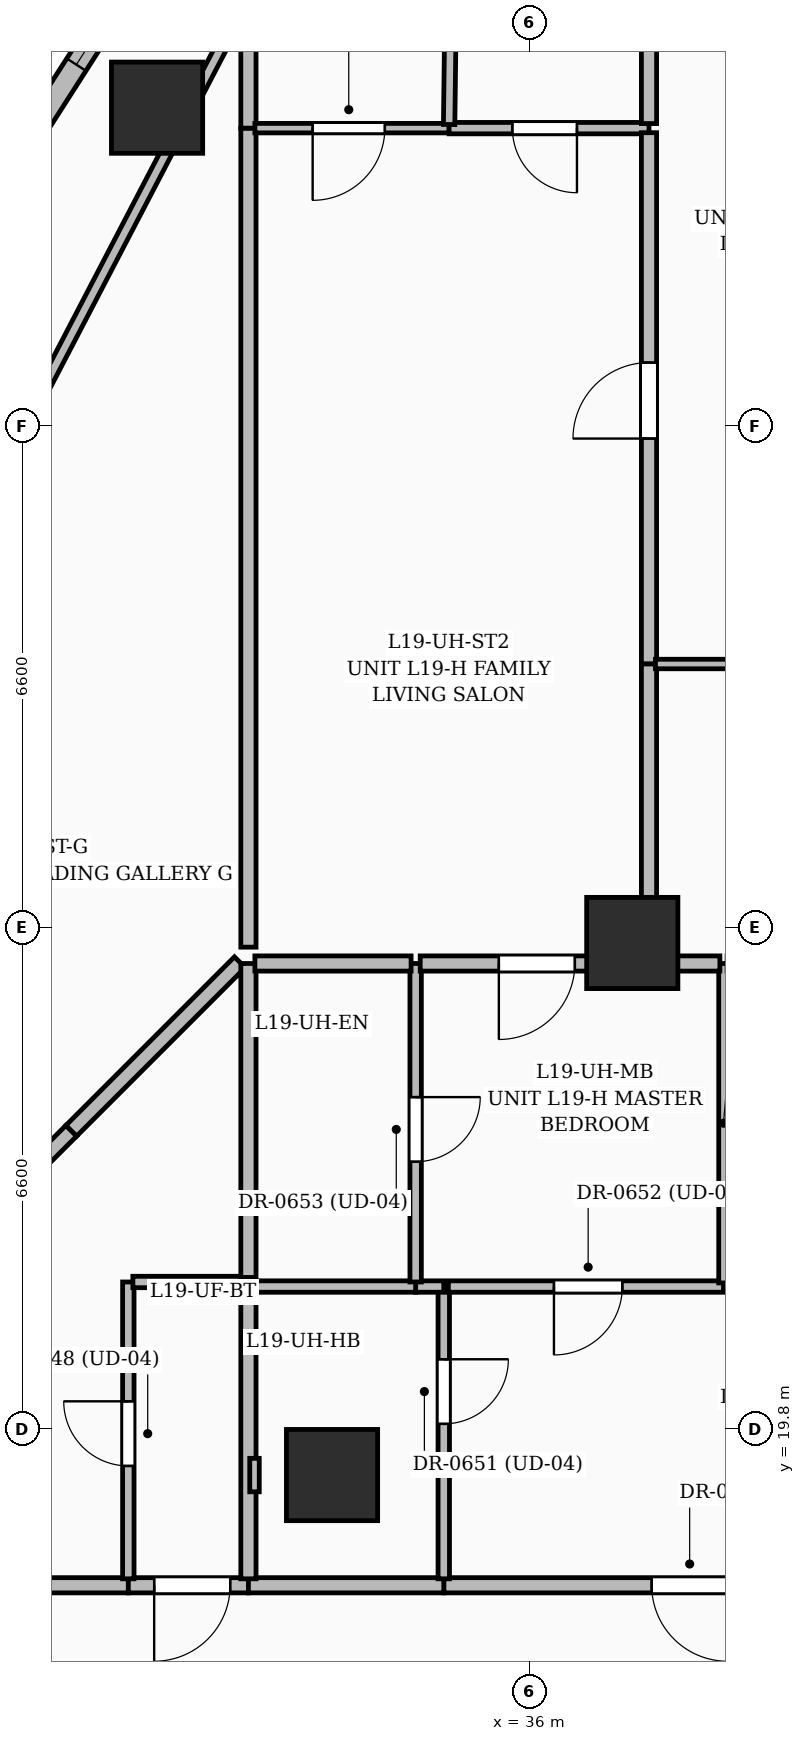
"""IFC4 building model, lengths in metres.
Left out: names, types, materials, properties, quantities, classifications, styles, units other than length and angle.
Written with IfcOpenShell. Run it as: python <this file> out.ifc"""

import sys

from ifc_helpers import new_model, si_unit, direction, frame, frame_2d, origin, origin_2d, place, context, subcontext, project, spatial, rectangle, extrude, element, fill, save


model = new_model("IFC4")
c1 = context("Model", 3, precision=1e-05, world=origin(), true_north=direction((0.0, 1.0)))
c2 = subcontext(c1, "Body", "Model", "MODEL_VIEW")
j1 = project(units=[si_unit("LENGTHUNIT", "METRE"), si_unit("PLANEANGLEUNIT", "RADIAN")], contexts=[c1])
p1 = place(None, origin())
s1 = spatial("IfcSite", under=j1, at=p1, CompositionType="ELEMENT")
p2 = place(p1, origin())
s2 = spatial("IfcBuilding", under=s1, at=p2, CompositionType="ELEMENT")
p3 = place(p2, frame((0.0, 0.0, 78.6)))
s3 = spatial("IfcBuildingStorey", under=s2, at=p3, CompositionType="ELEMENT", Elevation=78.6)
for number, where, z_axis, x_axis in (
    (1, (37.35, 26.2, 0.0), (0.0, 0.0, 1.0), (1.0, 0.0, 0.0)),
    (2, (33.4, 19.2, 0.0), (0.0, 0.0, 1.0), (1.0, 0.0, 0.0)),
    (3, (31.098, 37.189, 0.0), (0.0, 0.0, 1.0), (1.0, 0.0, 0.0)),
):
    element("IfcColumn", number, at=place(p3, frame(where, z_axis=z_axis, x_axis=x_axis)), inside=s3, PredefinedType="COLUMN", context=c2, shape_type="SweptSolid", body=[
        extrude(rectangle(XDim=1.2, YDim=1.2, at=origin_2d()), origin(), (0.0, 0.0, 1.0), 3.6),
    ])
p4 = place(p3, frame((29.524, 36.955, 0.0), z_axis=(0.0, 0.0, 1.0), x_axis=(0.539470626143, 0.842004420136, 0.0)))
e4 = element("IfcWall", 4, at=p4, inside=s3, PredefinedType="SOLIDWALL", context=c2, shape_type="SweptSolid", body=[
    extrude(rectangle(XDim=8.058, YDim=0.3, at=frame_2d((4.029, 0.0))), origin(), (0.0, 0.0, 1.0), 3.35),
])
p5 = place(p4, frame((0.95, 0.0, 0.6)))
e5 = element("IfcOpeningElement", 5, at=p5, cuts=e4, PredefinedType="OPENING", context=c2, shape_type="SweptSolid", body=[
    extrude(rectangle(XDim=2.4, YDim=2.1, at=frame_2d((1.2, 1.05))), frame((0.0, 0.16, 0.0), z_axis=(0.0, -1.0, 0.0), x_axis=(1.0, 0.0, 0.0)), (0.0, 0.0, 1.0), 0.32),
])
p6 = place(p3, frame((30.72, 17.75, 0.0), z_axis=(0.0, 0.0, 1.0), x_axis=(-1.0, 0.0, 0.0)))
e6 = element("IfcWall", 6, at=p6, inside=s3, PredefinedType="PARTITIONING", context=c2, shape_type="SweptSolid", body=[
    extrude(rectangle(XDim=6.57, YDim=0.2, at=frame_2d((3.285, 0.0))), origin(), (0.0, 0.0, 1.0), 2.345),
])
p7 = place(p6, frame((2.865, 0.0, 0.0)))
e7 = element("IfcOpeningElement", 7, at=p7, cuts=e6, PredefinedType="OPENING", context=c2, shape_type="SweptSolid", body=[
    extrude(rectangle(XDim=1.0, YDim=2.2, at=frame_2d((0.5, 1.1))), frame((0.0, 0.11, 0.0), z_axis=(0.0, -1.0, 0.0), x_axis=(1.0, 0.0, 0.0)), (0.0, 0.0, 1.0), 0.22),
])
p8 = place(p3, frame((32.3, 17.75, 0.0), z_axis=(0.0, 0.0, 1.0), x_axis=(-1.0, 0.0, 0.0)))
e8 = element("IfcWall", 8, at=p8, inside=s3, PredefinedType="PARTITIONING", context=c2, shape_type="SweptSolid", body=[
    extrude(rectangle(XDim=1.58, YDim=0.2, at=frame_2d((0.79, 0.0))), origin(), (0.0, 0.0, 1.0), 3.35),
])
p9 = place(p8, frame((0.24, 0.0, 0.0)))
e9 = element("IfcOpeningElement", 9, at=p9, cuts=e8, PredefinedType="OPENING", context=c2, shape_type="SweptSolid", body=[
    extrude(rectangle(XDim=1.0, YDim=2.2, at=frame_2d((0.5, 1.1))), frame((0.0, 0.11, 0.0), z_axis=(0.0, -1.0, 0.0), x_axis=(1.0, 0.0, 0.0)), (0.0, 0.0, 1.0), 0.22),
])
p10 = place(p3, frame((41.34, 17.75, 0.0), z_axis=(0.0, 0.0, 1.0), x_axis=(-1.0, 0.0, 0.0)))
e10 = element("IfcWall", 10, at=p10, inside=s3, PredefinedType="PARTITIONING", context=c2, shape_type="SweptSolid", body=[
    extrude(rectangle(XDim=6.47, YDim=0.2, at=frame_2d((3.235, 0.0))), origin(), (0.0, 0.0, 1.0), 3.35),
])
p11 = place(p10, frame((2.735, 0.0, 0.0)))
e11 = element("IfcOpeningElement", 11, at=p11, cuts=e10, PredefinedType="OPENING", context=c2, shape_type="SweptSolid", body=[
    extrude(rectangle(XDim=1.0, YDim=2.2, at=frame_2d((0.5, 1.1))), frame((0.0, 0.11, 0.0), z_axis=(0.0, -1.0, 0.0), x_axis=(1.0, 0.0, 0.0)), (0.0, 0.0, 1.0), 0.22),
])
p12 = place(p3, frame((34.87, 17.75, 0.0), z_axis=(0.0, 0.0, 1.0), x_axis=(-1.0, 0.0, 0.0)))
e12 = element("IfcWall", 12, at=p12, inside=s3, PredefinedType="PARTITIONING", context=c2, shape_type="SweptSolid", body=[
    extrude(rectangle(XDim=2.57, YDim=0.2, at=frame_2d((1.285, 0.0))), origin(), (0.0, 0.0, 1.0), 2.309),
])
p13 = place(p3, frame((21.4, 17.75, 0.0), z_axis=(0.0, 0.0, 1.0), x_axis=(0.46207959711, 0.886838455376, 0.0)))
e13 = element("IfcWall", 13, at=p13, inside=s3, PredefinedType="PARTITIONING", context=c2, shape_type="SweptSolid", body=[
    extrude(rectangle(XDim=23.589, YDim=0.15, at=frame_2d((11.795, 0.0))), origin(), (0.0, 0.0, 1.0), 2.345),
])
p14 = place(p3, frame((30.72, 17.835, 0.0), z_axis=(0.0, 0.0, 1.0), x_axis=(0.0, 1.0, 0.0)))
e14 = element("IfcWall", 14, at=p14, inside=s3, PredefinedType="PARTITIONING", context=c2, shape_type="SweptSolid", body=[
    extrude(rectangle(XDim=3.905, YDim=0.15, at=frame_2d((1.953, 0.0))), origin(), (0.0, 0.0, 1.0), 2.345),
])
p15 = place(p14, frame((1.485, 0.0, 0.0)))
e15 = element("IfcOpeningElement", 15, at=p15, cuts=e14, PredefinedType="OPENING", context=c2, shape_type="SweptSolid", body=[
    extrude(rectangle(XDim=0.85, YDim=2.1, at=frame_2d((0.425, 1.05))), frame((0.0, 0.085, 0.0), z_axis=(0.0, -1.0, 0.0), x_axis=(1.0, 0.0, 0.0)), (0.0, 0.0, 1.0), 0.17),
])
p16 = place(p3, frame((29.97, 23.73, 0.0), z_axis=(0.0, 0.0, 1.0), x_axis=(-0.707106781187, -0.707106781187, 0.0)))
e16 = element("IfcWall", 16, at=p16, inside=s3, PredefinedType="PARTITIONING", context=c2, shape_type="SweptSolid", body=[
    extrude(rectangle(XDim=8.372, YDim=0.2, at=frame_2d((4.186, 0.0))), origin(), (0.0, 0.0, 1.0), 2.345),
])
p17 = place(p3, frame((30.78, 21.74, 0.0), z_axis=(0.0, 0.0, 1.0), x_axis=(1.0, 0.0, 0.0)))
e17 = element("IfcWall", 17, at=p17, inside=s3, PredefinedType="PARTITIONING", context=c2, shape_type="SweptSolid", body=[
    extrude(rectangle(XDim=1.52, YDim=0.15, at=frame_2d((0.76, 0.0))), origin(), (0.0, 0.0, 1.0), 2.345),
])
p18 = place(p3, frame((32.187, 25.947, 0.0), z_axis=(0.0, 0.0, 1.0), x_axis=(-0.707106781187, -0.707106781187, 0.0)))
e18 = element("IfcWall", 18, at=p18, inside=s3, PredefinedType="PARTITIONING", context=c2, shape_type="SweptSolid", body=[
    extrude(rectangle(XDim=3.135, YDim=0.2, at=frame_2d((1.568, 0.0))), origin(), (0.0, 0.0, 1.0), 3.35),
])
p19 = place(p3, frame((32.3, 21.8, 0.0), z_axis=(0.0, 0.0, 1.0), x_axis=(0.0, 1.0, 0.0)))
e19 = element("IfcWall", 19, at=p19, inside=s3, PredefinedType="PARTITIONING", context=c2, shape_type="SweptSolid", body=[
    extrude(rectangle(XDim=4.13, YDim=0.2, at=frame_2d((2.065, 0.0))), origin(), (0.0, 0.0, 1.0), 3.01),
])
p20 = place(p3, frame((32.3, 17.835, 0.0), z_axis=(0.0, 0.0, 1.0), x_axis=(0.0, 1.0, 0.0)))
e20 = element("IfcWall", 20, at=p20, inside=s3, PredefinedType="PARTITIONING", context=c2, shape_type="SweptSolid", body=[
    extrude(rectangle(XDim=3.845, YDim=0.2, at=frame_2d((1.922, 0.0))), origin(), (0.0, 0.0, 1.0), 2.345),
])
p21 = place(p3, frame((32.3, 26.145, 0.0), z_axis=(0.0, 0.0, 1.0), x_axis=(0.0, 1.0, 0.0)))
e21 = element("IfcWall", 21, at=p21, inside=s3, PredefinedType="PARTITIONING", context=c2, shape_type="SweptSolid", body=[
    extrude(rectangle(XDim=10.775, YDim=0.2, at=frame_2d((5.387, 0.0))), origin(), (0.0, 0.0, 1.0), 2.345),
])
p22 = place(p3, frame((32.3, 36.92, 0.0), z_axis=(0.0, 0.0, 1.0), x_axis=(0.0, 1.0, 0.0)))
e22 = element("IfcWall", 22, at=p22, inside=s3, PredefinedType="PARTITIONING", context=c2, shape_type="SweptSolid", body=[
    extrude(rectangle(XDim=1.317, YDim=0.2, at=frame_2d((0.659, 0.0))), origin(), (0.0, 0.0, 1.0), 2.37),
])
p23 = place(p3, frame((34.87, 21.68, 0.0), z_axis=(0.0, 0.0, 1.0), x_axis=(0.0, -1.0, 0.0)))
e23 = element("IfcWall", 23, at=p23, inside=s3, PredefinedType="PARTITIONING", context=c2, shape_type="SweptSolid", body=[
    extrude(rectangle(XDim=3.845, YDim=0.15, at=frame_2d((1.922, 0.0))), origin(), (0.0, 0.0, 1.0), 2.309),
])
p24 = place(p23, frame((0.957, 0.0, 0.0)))
e24 = element("IfcOpeningElement", 24, at=p24, cuts=e23, PredefinedType="OPENING", context=c2, shape_type="SweptSolid", body=[
    extrude(rectangle(XDim=0.85, YDim=2.1, at=frame_2d((0.425, 1.05))), frame((0.0, 0.085, 0.0), z_axis=(0.0, -1.0, 0.0), x_axis=(1.0, 0.0, 0.0)), (0.0, 0.0, 1.0), 0.17),
])
p25 = place(p3, frame((41.292, 21.68, 0.0), z_axis=(0.0, 0.0, 1.0), x_axis=(-1.0, 0.0, 0.0)))
e25 = element("IfcWall", 25, at=p25, inside=s3, PredefinedType="PARTITIONING", context=c2, shape_type="SweptSolid", body=[
    extrude(rectangle(XDim=2.742, YDim=0.125, at=frame_2d((1.371, 0.0))), origin(), (0.0, 0.0, 1.0), 3.35),
])
p26 = place(p3, frame((38.55, 21.68, 0.0), z_axis=(0.0, 0.0, 1.0), x_axis=(-1.0, 0.0, 0.0)))
e26 = element("IfcWall", 26, at=p26, inside=s3, PredefinedType="PARTITIONING", context=c2, shape_type="SweptSolid", body=[
    extrude(rectangle(XDim=3.62, YDim=0.15, at=frame_2d((1.81, 0.0))), origin(), (0.0, 0.0, 1.0), 2.309),
])
p27 = place(p26, frame((1.331, 0.0, 0.0)))
e27 = element("IfcOpeningElement", 27, at=p27, cuts=e26, PredefinedType="OPENING", context=c2, shape_type="SweptSolid", body=[
    extrude(rectangle(XDim=0.9, YDim=2.15, at=frame_2d((0.45, 1.075))), frame((0.0, 0.085, 0.0), z_axis=(0.0, -1.0, 0.0), x_axis=(1.0, 0.0, 0.0)), (0.0, 0.0, 1.0), 0.17),
])
p28 = place(p3, frame((34.87, 21.68, 0.0), z_axis=(0.0, 0.0, 1.0), x_axis=(-1.0, 0.0, 0.0)))
e28 = element("IfcWall", 28, at=p28, inside=s3, PredefinedType="PARTITIONING", context=c2, shape_type="SweptSolid", body=[
    extrude(rectangle(XDim=0.37, YDim=0.15, at=frame_2d((0.185, 0.0))), origin(), (0.0, 0.0, 1.0), 2.309),
])
p29 = place(p3, frame((34.5, 21.68, 0.0), z_axis=(0.0, 0.0, 1.0), x_axis=(-1.0, 0.0, 0.0)))
e29 = element("IfcWall", 29, at=p29, inside=s3, PredefinedType="PARTITIONING", context=c2, shape_type="SweptSolid", body=[
    extrude(rectangle(XDim=2.115, YDim=0.15, at=frame_2d((1.058, 0.0))), origin(), (0.0, 0.0, 1.0), 3.35),
])
p30 = place(p3, frame((38.55, 25.93, 0.0), z_axis=(0.0, 0.0, 1.0), x_axis=(0.0, -1.0, 0.0)))
e30 = element("IfcWall", 30, at=p30, inside=s3, PredefinedType="PARTITIONING", context=c2, shape_type="SweptSolid", body=[
    extrude(rectangle(XDim=4.202, YDim=0.125, at=frame_2d((2.101, 0.0))), origin(), (0.0, 0.0, 1.0), 3.35),
])
p31 = place(p3, frame((34.5, 25.93, 0.0), z_axis=(0.0, 0.0, 1.0), x_axis=(0.0, -1.0, 0.0)))
e31 = element("IfcWall", 31, at=p31, inside=s3, PredefinedType="PARTITIONING", context=c2, shape_type="SweptSolid", body=[
    extrude(rectangle(XDim=4.19, YDim=0.15, at=frame_2d((2.095, 0.0))), origin(), (0.0, 0.0, 1.0), 3.35),
])
p32 = place(p31, frame((1.758, 0.0, 0.0)))
e32 = element("IfcOpeningElement", 32, at=p32, cuts=e31, PredefinedType="OPENING", context=c2, shape_type="SweptSolid", body=[
    extrude(rectangle(XDim=0.85, YDim=2.1, at=frame_2d((0.425, 1.05))), frame((0.0, 0.085, 0.0), z_axis=(0.0, -1.0, 0.0), x_axis=(1.0, 0.0, 0.0)), (0.0, 0.0, 1.0), 0.17),
])
p33 = place(p3, frame((37.57, 25.93, 0.0), z_axis=(0.0, 0.0, 1.0), x_axis=(-1.0, 0.0, 0.0)))
e33 = element("IfcWall", 33, at=p33, inside=s3, PredefinedType="PARTITIONING", context=c2, shape_type="SweptSolid", body=[
    extrude(rectangle(XDim=3.01, YDim=0.2, at=frame_2d((1.505, 0.0))), origin(), (0.0, 0.0, 1.0), 3.35),
])
p34 = place(p33, frame((0.975, 0.0, 0.0)))
e34 = element("IfcOpeningElement", 34, at=p34, cuts=e33, PredefinedType="OPENING", context=c2, shape_type="SweptSolid", body=[
    extrude(rectangle(XDim=1.0, YDim=2.2, at=frame_2d((0.5, 1.1))), frame((0.0, 0.11, 0.0), z_axis=(0.0, -1.0, 0.0), x_axis=(1.0, 0.0, 0.0)), (0.0, 0.0, 1.0), 0.22),
])
p35 = place(p3, frame((38.502, 25.93, 0.0), z_axis=(0.0, 0.0, 1.0), x_axis=(-1.0, 0.0, 0.0)))
e35 = element("IfcWall", 35, at=p35, inside=s3, PredefinedType="PARTITIONING", context=c2, shape_type="SweptSolid", body=[
    extrude(rectangle(XDim=0.932, YDim=0.2, at=frame_2d((0.466, 0.0))), origin(), (0.0, 0.0, 1.0), 2.309),
])
p36 = place(p3, frame((34.44, 25.93, 0.0), z_axis=(0.0, 0.0, 1.0), x_axis=(-1.0, 0.0, 0.0)))
e36 = element("IfcWall", 36, at=p36, inside=s3, PredefinedType="PARTITIONING", context=c2, shape_type="SweptSolid", body=[
    extrude(rectangle(XDim=2.055, YDim=0.2, at=frame_2d((1.027, 0.0))), origin(), (0.0, 0.0, 1.0), 3.01),
])
p37 = place(p3, frame((34.94, 36.92, 0.0), z_axis=(0.0, 0.0, 1.0), x_axis=(-1.0, 0.0, 0.0)))
e37 = element("IfcWall", 37, at=p37, inside=s3, PredefinedType="PARTITIONING", context=c2, shape_type="SweptSolid", body=[
    extrude(rectangle(XDim=2.555, YDim=0.125, at=frame_2d((1.277, 0.0))), origin(), (0.0, 0.0, 1.0), 2.37),
])
p38 = place(p37, frame((0.845, 0.0, 0.0)))
e38 = element("IfcOpeningElement", 38, at=p38, cuts=e37, PredefinedType="OPENING", context=c2, shape_type="SweptSolid", body=[
    extrude(rectangle(XDim=0.95, YDim=2.2, at=frame_2d((0.475, 1.1))), frame((0.0, 0.072, 0.0), z_axis=(0.0, -1.0, 0.0), x_axis=(1.0, 0.0, 0.0)), (0.0, 0.0, 1.0), 0.145),
])
p39 = place(p3, frame((37.57, 36.92, 0.0), z_axis=(0.0, 0.0, 1.0), x_axis=(-1.0, 0.0, 0.0)))
e39 = element("IfcWall", 39, at=p39, inside=s3, PredefinedType="PARTITIONING", context=c2, shape_type="SweptSolid", body=[
    extrude(rectangle(XDim=2.63, YDim=0.15, at=frame_2d((1.315, 0.0))), origin(), (0.0, 0.0, 1.0), 2.37),
])
p40 = place(p39, frame((0.948, 0.0, 0.0)))
e40 = element("IfcOpeningElement", 40, at=p40, cuts=e39, PredefinedType="OPENING", context=c2, shape_type="SweptSolid", body=[
    extrude(rectangle(XDim=0.85, YDim=2.1, at=frame_2d((0.425, 1.05))), frame((0.0, 0.085, 0.0), z_axis=(0.0, -1.0, 0.0), x_axis=(1.0, 0.0, 0.0)), (0.0, 0.0, 1.0), 0.17),
])
p41 = place(p3, frame((37.57, 29.87, 0.0), z_axis=(0.0, 0.0, 1.0), x_axis=(0.0, 1.0, 0.0)))
e41 = element("IfcWall", 41, at=p41, inside=s3, PredefinedType="PARTITIONING", context=c2, shape_type="SweptSolid", body=[
    extrude(rectangle(XDim=6.99, YDim=0.2, at=frame_2d((3.495, 0.0))), origin(), (0.0, 0.0, 1.0), 2.37),
])
p42 = place(p41, frame((2.966, 0.0, 0.0)))
e42 = element("IfcOpeningElement", 42, at=p42, cuts=e41, PredefinedType="OPENING", context=c2, shape_type="SweptSolid", body=[
    extrude(rectangle(XDim=1.0, YDim=2.2, at=frame_2d((0.5, 1.1))), frame((0.0, 0.11, 0.0), z_axis=(0.0, -1.0, 0.0), x_axis=(1.0, 0.0, 0.0)), (0.0, 0.0, 1.0), 0.22),
])
p43 = place(p3, frame((37.57, 26.015, 0.0), z_axis=(0.0, 0.0, 1.0), x_axis=(0.0, 1.0, 0.0)))
e43 = element("IfcWall", 43, at=p43, inside=s3, PredefinedType="PARTITIONING", context=c2, shape_type="SweptSolid", body=[
    extrude(rectangle(XDim=3.855, YDim=0.2, at=frame_2d((1.928, 0.0))), origin(), (0.0, 0.0, 1.0), 3.01),
])
p44 = place(p3, frame((34.94, 36.968, 0.0), z_axis=(0.0, 0.0, 1.0), x_axis=(0.012728014725, 0.99991899554, 0.0)))
e44 = element("IfcWall", 44, at=p44, inside=s3, PredefinedType="PARTITIONING", context=c2, shape_type="SweptSolid", body=[
    extrude(rectangle(XDim=4.757, YDim=0.15, at=frame_2d((2.378, 0.0))), origin(), (0.0, 0.0, 1.0), 2.37),
])
p45 = place(p3, frame((37.57, 36.98, 0.0), z_axis=(0.0, 0.0, 1.0), x_axis=(0.0, 1.0, 0.0)))
e45 = element("IfcWall", 45, at=p45, inside=s3, PredefinedType="PARTITIONING", context=c2, shape_type="SweptSolid", body=[
    extrude(rectangle(XDim=2.82, YDim=0.2, at=frame_2d((1.41, 0.0))), origin(), (0.0, 0.0, 1.0), 2.37),
])
p46 = place(p3, frame((37.655, 29.87, 0.0), z_axis=(0.0, 0.0, 1.0), x_axis=(1.0, 0.0, 0.0)))
e46 = element("IfcWall", 46, at=p46, inside=s3, PredefinedType="PARTITIONING", context=c2, shape_type="SweptSolid", body=[
    extrude(rectangle(XDim=4.175, YDim=0.125, at=frame_2d((2.087, 0.0))), origin(), (0.0, 0.0, 1.0), 3.35),
])
p47 = place(p46, frame((1.57, 0.0, 0.0)))
e47 = element("IfcOpeningElement", 47, at=p47, cuts=e46, PredefinedType="OPENING", context=c2, shape_type="SweptSolid", body=[
    extrude(rectangle(XDim=0.95, YDim=2.2, at=frame_2d((0.475, 1.1))), frame((0.0, 0.072, 0.0), z_axis=(0.0, -1.0, 0.0), x_axis=(1.0, 0.0, 0.0)), (0.0, 0.0, 1.0), 0.145),
])
p48 = place(p3, frame((32.38, 18.98, 0.0), z_axis=(0.0, 0.0, 1.0), x_axis=(0.0, 1.0, 0.0)))
e48 = element("IfcWall", 48, at=p48, inside=s3, PredefinedType="PARTITIONING", context=c2, shape_type="SweptSolid", body=[
    extrude(rectangle(XDim=0.44, YDim=0.125, at=frame_2d((0.22, 0.0))), origin(), (0.0, 0.0, 1.0), 3.35),
])
p49 = place(p5, origin())
e49 = element("IfcWindow", 49, at=p49, inside=s3, PartitioningType="SINGLE_PANEL", PredefinedType="WINDOW", context=c2, shape_type="SweptSolid", body=[
    extrude(rectangle(XDim=2.4, YDim=2.1, at=frame_2d((1.2, 1.05))), frame((0.0, 0.03, 0.0), z_axis=(0.0, -1.0, 0.0), x_axis=(1.0, 0.0, 0.0)), (0.0, 0.0, 1.0), 0.06),
])
fill(e5, e49)
p50 = place(p15, origin())
e50 = element("IfcDoor", 50, at=p50, inside=s3, OperationType="SINGLE_SWING_RIGHT", PredefinedType="DOOR", context=c2, shape_type="SweptSolid", body=[
    extrude(rectangle(XDim=0.85, YDim=2.1, at=frame_2d((0.425, 1.05))), frame((0.0, 0.025, 0.0), z_axis=(0.0, -1.0, 0.0), x_axis=(1.0, 0.0, 0.0)), (0.0, 0.0, 1.0), 0.05),
])
fill(e15, e50)
p51 = place(p11, origin())
e51 = element("IfcDoor", 51, at=p51, inside=s3, OperationType="SINGLE_SWING_LEFT", PredefinedType="DOOR", context=c2, shape_type="SweptSolid", body=[
    extrude(rectangle(XDim=1.0, YDim=2.2, at=frame_2d((0.5, 1.1))), frame((0.0, 0.025, 0.0), z_axis=(0.0, -1.0, 0.0), x_axis=(1.0, 0.0, 0.0)), (0.0, 0.0, 1.0), 0.05),
])
fill(e11, e51)
p52 = place(p24, origin())
e52 = element("IfcDoor", 52, at=p52, inside=s3, OperationType="SINGLE_SWING_LEFT", PredefinedType="DOOR", context=c2, shape_type="SweptSolid", body=[
    extrude(rectangle(XDim=0.85, YDim=2.1, at=frame_2d((0.425, 1.05))), frame((0.0, 0.025, 0.0), z_axis=(0.0, -1.0, 0.0), x_axis=(1.0, 0.0, 0.0)), (0.0, 0.0, 1.0), 0.05),
])
fill(e24, e52)
p53 = place(p27, origin())
e53 = element("IfcDoor", 53, at=p53, inside=s3, OperationType="SINGLE_SWING_RIGHT", PredefinedType="DOOR", context=c2, shape_type="SweptSolid", body=[
    extrude(rectangle(XDim=0.9, YDim=2.15, at=frame_2d((0.45, 1.075))), frame((0.0, 0.025, 0.0), z_axis=(0.0, -1.0, 0.0), x_axis=(1.0, 0.0, 0.0)), (0.0, 0.0, 1.0), 0.05),
])
fill(e27, e53)
p54 = place(p32, origin())
e54 = element("IfcDoor", 54, at=p54, inside=s3, OperationType="SINGLE_SWING_LEFT", PredefinedType="DOOR", context=c2, shape_type="SweptSolid", body=[
    extrude(rectangle(XDim=0.85, YDim=2.1, at=frame_2d((0.425, 1.05))), frame((0.0, 0.025, 0.0), z_axis=(0.0, -1.0, 0.0), x_axis=(1.0, 0.0, 0.0)), (0.0, 0.0, 1.0), 0.05),
])
fill(e32, e54)
p55 = place(p38, origin())
e55 = element("IfcDoor", 55, at=p55, inside=s3, OperationType="SINGLE_SWING_RIGHT", PredefinedType="DOOR", context=c2, shape_type="SweptSolid", body=[
    extrude(rectangle(XDim=0.95, YDim=2.2, at=frame_2d((0.475, 1.1))), frame((0.0, 0.025, 0.0), z_axis=(0.0, -1.0, 0.0), x_axis=(1.0, 0.0, 0.0)), (0.0, 0.0, 1.0), 0.05),
])
fill(e38, e55)
p56 = place(p40, origin())
e56 = element("IfcDoor", 56, at=p56, inside=s3, OperationType="SINGLE_SWING_LEFT", PredefinedType="DOOR", context=c2, shape_type="SweptSolid", body=[
    extrude(rectangle(XDim=0.85, YDim=2.1, at=frame_2d((0.425, 1.05))), frame((0.0, 0.025, 0.0), z_axis=(0.0, -1.0, 0.0), x_axis=(1.0, 0.0, 0.0)), (0.0, 0.0, 1.0), 0.05),
])
fill(e40, e56)
p57 = place(p34, origin())
e57 = element("IfcDoor", 57, at=p57, inside=s3, OperationType="SINGLE_SWING_RIGHT", PredefinedType="DOOR", context=c2, shape_type="SweptSolid", body=[
    extrude(rectangle(XDim=1.0, YDim=2.2, at=frame_2d((0.5, 1.1))), frame((0.0, 0.025, 0.0), z_axis=(0.0, -1.0, 0.0), x_axis=(1.0, 0.0, 0.0)), (0.0, 0.0, 1.0), 0.05),
])
fill(e34, e57)
p58 = place(p42, origin())
e58 = element("IfcDoor", 58, at=p58, inside=s3, OperationType="SINGLE_SWING_LEFT", PredefinedType="DOOR", context=c2, shape_type="SweptSolid", body=[
    extrude(rectangle(XDim=1.0, YDim=2.2, at=frame_2d((0.5, 1.1))), frame((0.0, 0.025, 0.0), z_axis=(0.0, -1.0, 0.0), x_axis=(1.0, 0.0, 0.0)), (0.0, 0.0, 1.0), 0.05),
])
fill(e42, e58)
p59 = place(p9, origin())
e59 = element("IfcDoor", 59, at=p59, inside=s3, OperationType="SINGLE_SWING_RIGHT", PredefinedType="DOOR", context=c2, shape_type="SweptSolid", body=[
    extrude(rectangle(XDim=1.0, YDim=2.2, at=frame_2d((0.5, 1.1))), frame((0.0, 0.025, 0.0), z_axis=(0.0, -1.0, 0.0), x_axis=(1.0, 0.0, 0.0)), (0.0, 0.0, 1.0), 0.05),
])
fill(e9, e59)
save(model, sys.argv[1])
